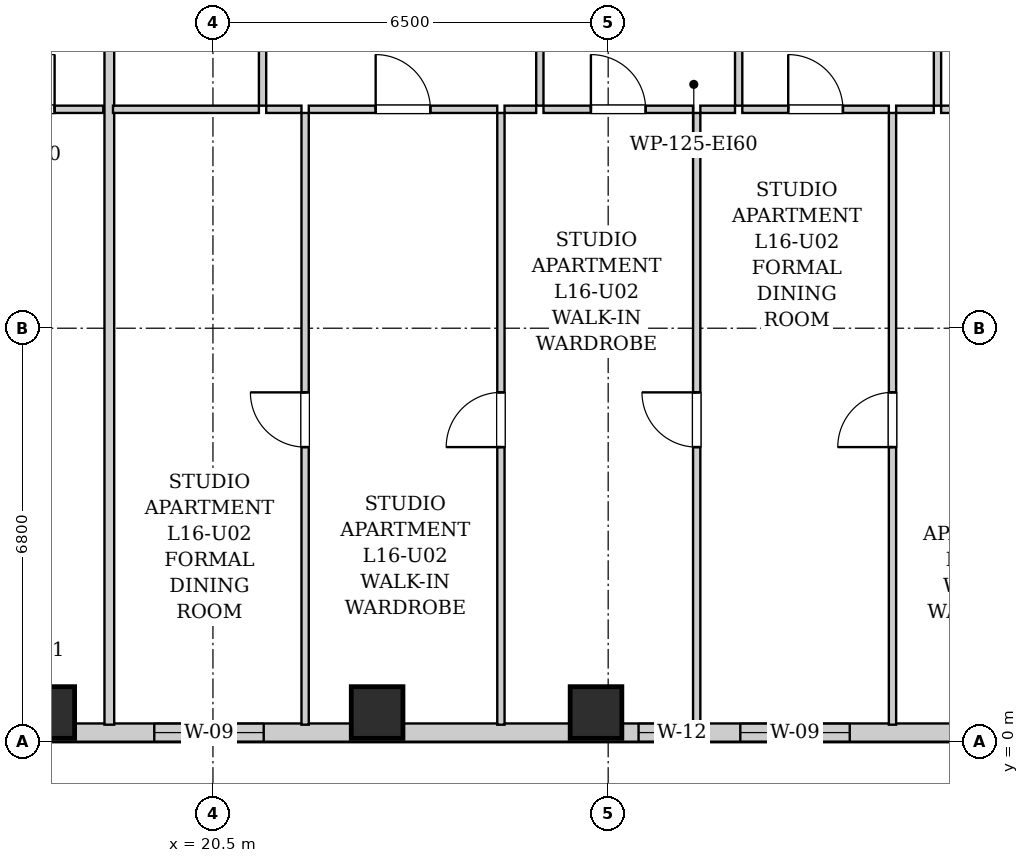
"""IFC4 building model, lengths in metres.
Left out: names, types, materials, properties, quantities, classifications, styles, units other than length and angle.
Written with IfcOpenShell. Run it as: python <this file> out.ifc"""

import sys

from ifc_helpers import new_model, si_unit, direction, frame, frame_2d, origin, origin_2d, place, context, subcontext, project, spatial, rectangle, extrude, element, fill, save


model = new_model("IFC4")
c1 = context("Model", 3, precision=1e-05, world=origin(), true_north=direction((0.0, 1.0)))
c2 = subcontext(c1, "Body", "Model", "MODEL_VIEW")
j1 = project(units=[si_unit("LENGTHUNIT", "METRE"), si_unit("PLANEANGLEUNIT", "RADIAN")], contexts=[c1])
p1 = place(None, origin())
s1 = spatial("IfcSite", under=j1, at=p1, CompositionType="ELEMENT")
p2 = place(p1, origin())
s2 = spatial("IfcBuilding", under=s1, at=p2, CompositionType="ELEMENT")
p3 = place(p2, frame((0.0, 0.0, 61.0)))
s3 = spatial("IfcBuildingStorey", under=s2, at=p3, CompositionType="ELEMENT", Elevation=61.0)
for number, where, z_axis, x_axis in (
    (1, (17.8, 0.48, 0.0), (0.0, 0.0, 1.0), (1.0, 0.0, 0.0)),
    (2, (23.2, 0.48, 0.0), (0.0, 0.0, 1.0), (1.0, 0.0, 0.0)),
    (3, (26.8, 0.48, 0.0), (0.0, 0.0, 1.0), (1.0, 0.0, 0.0)),
):
    element("IfcColumn", number, at=place(p3, frame(where, z_axis=z_axis, x_axis=x_axis)), inside=s3, PredefinedType="COLUMN", context=c2, shape_type="SweptSolid", body=[
        extrude(rectangle(XDim=0.85, YDim=0.85, at=origin_2d()), origin(), (0.0, 0.0, 1.0), 3.2),
    ])
p4 = place(p3, frame((44.0, 0.15, 0.0), z_axis=(0.0, 0.0, 1.0), x_axis=(-1.0, 0.0, 0.0)))
e4 = element("IfcWall", 4, at=p4, inside=s3, PredefinedType="SOLIDWALL", context=c2, shape_type="SweptSolid", body=[
    extrude(rectangle(XDim=26.35, YDim=0.3, at=frame_2d((13.175, 0.0))), origin(), (0.0, 0.0, 1.0), 1.975),
])
p5 = place(p4, frame((22.665, 0.0, 0.55)))
e5 = element("IfcOpeningElement", 5, at=p5, cuts=e4, PredefinedType="OPENING", context=c2, shape_type="SweptSolid", body=[
    extrude(rectangle(XDim=1.8, YDim=1.2, at=frame_2d((0.9, 0.6))), frame((0.0, 0.16, 0.0), z_axis=(0.0, -1.0, 0.0), x_axis=(1.0, 0.0, 0.0)), (0.0, 0.0, 1.0), 0.32),
])
p6 = place(p4, frame((15.82, 0.0, 0.55)))
e6 = element("IfcOpeningElement", 6, at=p6, cuts=e4, PredefinedType="OPENING", context=c2, shape_type="SweptSolid", body=[
    extrude(rectangle(XDim=0.68, YDim=1.2, at=frame_2d((0.34, 0.6))), frame((0.0, 0.16, 0.0), z_axis=(0.0, -1.0, 0.0), x_axis=(1.0, 0.0, 0.0)), (0.0, 0.0, 1.0), 0.32),
])
p7 = place(p4, frame((13.027, 0.0, 0.55)))
e7 = element("IfcOpeningElement", 7, at=p7, cuts=e4, PredefinedType="OPENING", context=c2, shape_type="SweptSolid", body=[
    extrude(rectangle(XDim=1.8, YDim=1.2, at=frame_2d((0.9, 0.6))), frame((0.0, 0.16, 0.0), z_axis=(0.0, -1.0, 0.0), x_axis=(1.0, 0.0, 0.0)), (0.0, 0.0, 1.0), 0.32),
])
p8 = place(p4, frame((9.365, 0.0, 0.55)))
e8 = element("IfcOpeningElement", 8, at=p8, cuts=e4, PredefinedType="OPENING", context=c2, shape_type="SweptSolid", body=[
    extrude(rectangle(XDim=0.85, YDim=1.2, at=frame_2d((0.425, 0.6))), frame((0.0, 0.16, 0.0), z_axis=(0.0, -1.0, 0.0), x_axis=(1.0, 0.0, 0.0)), (0.0, 0.0, 1.0), 0.32),
])
p9 = place(p4, frame((6.553, 0.0, 0.55)))
e9 = element("IfcOpeningElement", 9, at=p9, cuts=e4, PredefinedType="OPENING", context=c2, shape_type="SweptSolid", body=[
    extrude(rectangle(XDim=1.8, YDim=1.2, at=frame_2d((0.9, 0.6))), frame((0.0, 0.16, 0.0), z_axis=(0.0, -1.0, 0.0), x_axis=(1.0, 0.0, 0.0)), (0.0, 0.0, 1.0), 0.32),
])
p10 = place(p4, frame((2.262, 0.0, 0.55)))
e10 = element("IfcOpeningElement", 10, at=p10, cuts=e4, PredefinedType="OPENING", context=c2, shape_type="SweptSolid", body=[
    extrude(rectangle(XDim=1.8, YDim=1.2, at=frame_2d((0.9, 0.6))), frame((0.0, 0.16, 0.0), z_axis=(0.0, -1.0, 0.0), x_axis=(1.0, 0.0, 0.0)), (0.0, 0.0, 1.0), 0.32),
])
p11 = place(p3, frame((16.196, 10.4, 0.0), z_axis=(0.0, 0.0, 1.0), x_axis=(1.0, 0.0, 0.0)))
e11 = element("IfcWall", 11, at=p11, inside=s3, PredefinedType="PARTITIONING", context=c2, shape_type="SweptSolid", body=[
    extrude(rectangle(XDim=2.5, YDim=0.12, at=frame_2d((1.25, 0.0))), origin(), (0.0, 0.0, 1.0), 2.94),
])
p12 = place(p11, frame((0.8, 0.0, 0.0)))
e12 = element("IfcOpeningElement", 12, at=p12, cuts=e11, PredefinedType="OPENING", context=c2, shape_type="SweptSolid", body=[
    extrude(rectangle(XDim=0.9, YDim=2.05, at=frame_2d((0.45, 1.025))), frame((0.0, 0.07, 0.0), z_axis=(0.0, -1.0, 0.0), x_axis=(1.0, 0.0, 0.0)), (0.0, 0.0, 1.0), 0.14),
])
p13 = place(p3, frame((18.796, 0.28, 0.0), z_axis=(0.0, 0.0, 1.0), x_axis=(0.0, 1.0, 0.0)))
e13 = element("IfcWall", 13, at=p13, inside=s3, PredefinedType="PARTITIONING", context=c2, shape_type="SweptSolid", body=[
    extrude(rectangle(XDim=13.03, YDim=0.16, at=frame_2d((6.515, 0.0))), origin(), (0.0, 0.0, 1.0), 2.94),
])
p14 = place(p3, frame((21.316, 10.46, 0.0), z_axis=(0.0, 0.0, 1.0), x_axis=(0.0, 1.0, 0.0)))
e14 = element("IfcWall", 14, at=p14, inside=s3, PredefinedType="PARTITIONING", context=c2, shape_type="SweptSolid", body=[
    extrude(rectangle(XDim=2.85, YDim=0.12, at=frame_2d((1.425, 0.0))), origin(), (0.0, 0.0, 1.0), 2.94),
])
p15 = place(p14, frame((0.995, 0.0, 0.0)))
e15 = element("IfcOpeningElement", 15, at=p15, cuts=e14, PredefinedType="OPENING", context=c2, shape_type="SweptSolid", body=[
    extrude(rectangle(XDim=0.86, YDim=2.05, at=frame_2d((0.43, 1.025))), frame((0.0, 0.07, 0.0), z_axis=(0.0, -1.0, 0.0), x_axis=(1.0, 0.0, 0.0)), (0.0, 0.0, 1.0), 0.14),
])
p16 = place(p3, frame((18.856, 10.4, 0.0), z_axis=(0.0, 0.0, 1.0), x_axis=(1.0, 0.0, 0.0)))
e16 = element("IfcWall", 16, at=p16, inside=s3, PredefinedType="PARTITIONING", context=c2, shape_type="SweptSolid", body=[
    extrude(rectangle(XDim=2.4, YDim=0.12, at=frame_2d((1.2, 0.0))), origin(), (0.0, 0.0, 1.0), 2.94),
])
p17 = place(p3, frame((25.876, 10.46, 0.0), z_axis=(0.0, 0.0, 1.0), x_axis=(0.0, 1.0, 0.0)))
e17 = element("IfcWall", 17, at=p17, inside=s3, PredefinedType="PARTITIONING", context=c2, shape_type="SweptSolid", body=[
    extrude(rectangle(XDim=2.85, YDim=0.12, at=frame_2d((1.425, 0.0))), origin(), (0.0, 0.0, 1.0), 2.94),
])
p18 = place(p17, frame((0.975, 0.0, 0.0)))
e18 = element("IfcOpeningElement", 18, at=p18, cuts=e17, PredefinedType="OPENING", context=c2, shape_type="SweptSolid", body=[
    extrude(rectangle(XDim=0.9, YDim=2.05, at=frame_2d((0.45, 1.025))), frame((0.0, 0.07, 0.0), z_axis=(0.0, -1.0, 0.0), x_axis=(1.0, 0.0, 0.0)), (0.0, 0.0, 1.0), 0.14),
])
p19 = place(p3, frame((21.376, 10.4, 0.0), z_axis=(0.0, 0.0, 1.0), x_axis=(1.0, 0.0, 0.0)))
e19 = element("IfcWall", 19, at=p19, inside=s3, PredefinedType="PARTITIONING", context=c2, shape_type="SweptSolid", body=[
    extrude(rectangle(XDim=0.58, YDim=0.12, at=frame_2d((0.29, 0.0))), origin(), (0.0, 0.0, 1.0), 2.94),
])
p20 = place(p3, frame((22.076, 10.4, 0.0), z_axis=(0.0, 0.0, 1.0), x_axis=(1.0, 0.0, 0.0)))
e20 = element("IfcWall", 20, at=p20, inside=s3, PredefinedType="PARTITIONING", context=c2, shape_type="SweptSolid", body=[
    extrude(rectangle(XDim=3.1, YDim=0.12, at=frame_2d((1.55, 0.0))), origin(), (0.0, 0.0, 1.0), 2.94),
])
p21 = place(p20, frame((1.1, 0.0, 0.0)))
e21 = element("IfcOpeningElement", 21, at=p21, cuts=e20, PredefinedType="OPENING", context=c2, shape_type="SweptSolid", body=[
    extrude(rectangle(XDim=0.9, YDim=2.05, at=frame_2d((0.45, 1.025))), frame((0.0, 0.07, 0.0), z_axis=(0.0, -1.0, 0.0), x_axis=(1.0, 0.0, 0.0)), (0.0, 0.0, 1.0), 0.14),
])
p22 = place(p3, frame((25.296, 10.4, 0.0), z_axis=(0.0, 0.0, 1.0), x_axis=(1.0, 0.0, 0.0)))
e22 = element("IfcWall", 22, at=p22, inside=s3, PredefinedType="PARTITIONING", context=c2, shape_type="SweptSolid", body=[
    extrude(rectangle(XDim=0.52, YDim=0.12, at=frame_2d((0.26, 0.0))), origin(), (0.0, 0.0, 1.0), 2.94),
])
p23 = place(p3, frame((29.146, 10.46, 0.0), z_axis=(0.0, 0.0, 1.0), x_axis=(0.0, 1.0, 0.0)))
e23 = element("IfcWall", 23, at=p23, inside=s3, PredefinedType="PARTITIONING", context=c2, shape_type="SweptSolid", body=[
    extrude(rectangle(XDim=2.85, YDim=0.12, at=frame_2d((1.425, 0.0))), origin(), (0.0, 0.0, 1.0), 2.94),
])
p24 = place(p23, frame((0.975, 0.0, 0.0)))
e24 = element("IfcOpeningElement", 24, at=p24, cuts=e23, PredefinedType="OPENING", context=c2, shape_type="SweptSolid", body=[
    extrude(rectangle(XDim=0.9, YDim=2.05, at=frame_2d((0.45, 1.025))), frame((0.0, 0.07, 0.0), z_axis=(0.0, -1.0, 0.0), x_axis=(1.0, 0.0, 0.0)), (0.0, 0.0, 1.0), 0.14),
])
p25 = place(p3, frame((25.936, 10.4, 0.0), z_axis=(0.0, 0.0, 1.0), x_axis=(1.0, 0.0, 0.0)))
e25 = element("IfcWall", 25, at=p25, inside=s3, PredefinedType="PARTITIONING", context=c2, shape_type="SweptSolid", body=[
    extrude(rectangle(XDim=2.46, YDim=0.12, at=frame_2d((1.23, 0.0))), origin(), (0.0, 0.0, 1.0), 2.94),
])
p26 = place(p25, frame((0.78, 0.0, 0.0)))
e26 = element("IfcOpeningElement", 26, at=p26, cuts=e25, PredefinedType="OPENING", context=c2, shape_type="SweptSolid", body=[
    extrude(rectangle(XDim=0.9, YDim=2.05, at=frame_2d((0.45, 1.025))), frame((0.0, 0.07, 0.0), z_axis=(0.0, -1.0, 0.0), x_axis=(1.0, 0.0, 0.0)), (0.0, 0.0, 1.0), 0.14),
])
p27 = place(p3, frame((28.516, 10.4, 0.0), z_axis=(0.0, 0.0, 1.0), x_axis=(1.0, 0.0, 0.0)))
e27 = element("IfcWall", 27, at=p27, inside=s3, PredefinedType="PARTITIONING", context=c2, shape_type="SweptSolid", body=[
    extrude(rectangle(XDim=0.57, YDim=0.12, at=frame_2d((0.285, 0.0))), origin(), (0.0, 0.0, 1.0), 2.94),
])
p28 = place(p3, frame((32.416, 10.46, 0.0), z_axis=(0.0, 0.0, 1.0), x_axis=(0.0, 1.0, 0.0)))
e28 = element("IfcWall", 28, at=p28, inside=s3, PredefinedType="PARTITIONING", context=c2, shape_type="SweptSolid", body=[
    extrude(rectangle(XDim=2.85, YDim=0.12, at=frame_2d((1.425, 0.0))), origin(), (0.0, 0.0, 1.0), 2.94),
])
p29 = place(p28, frame((0.975, 0.0, 0.0)))
e29 = element("IfcOpeningElement", 29, at=p29, cuts=e28, PredefinedType="OPENING", context=c2, shape_type="SweptSolid", body=[
    extrude(rectangle(XDim=0.9, YDim=2.05, at=frame_2d((0.45, 1.025))), frame((0.0, 0.07, 0.0), z_axis=(0.0, -1.0, 0.0), x_axis=(1.0, 0.0, 0.0)), (0.0, 0.0, 1.0), 0.14),
])
p30 = place(p3, frame((29.206, 10.4, 0.0), z_axis=(0.0, 0.0, 1.0), x_axis=(1.0, 0.0, 0.0)))
e30 = element("IfcWall", 30, at=p30, inside=s3, PredefinedType="PARTITIONING", context=c2, shape_type="SweptSolid", body=[
    extrude(rectangle(XDim=2.41, YDim=0.12, at=frame_2d((1.205, 0.0))), origin(), (0.0, 0.0, 1.0), 2.94),
])
p31 = place(p30, frame((0.755, 0.0, 0.0)))
e31 = element("IfcOpeningElement", 31, at=p31, cuts=e30, PredefinedType="OPENING", context=c2, shape_type="SweptSolid", body=[
    extrude(rectangle(XDim=0.9, YDim=2.05, at=frame_2d((0.45, 1.025))), frame((0.0, 0.07, 0.0), z_axis=(0.0, -1.0, 0.0), x_axis=(1.0, 0.0, 0.0)), (0.0, 0.0, 1.0), 0.14),
])
p32 = place(p3, frame((31.736, 10.4, 0.0), z_axis=(0.0, 0.0, 1.0), x_axis=(1.0, 0.0, 0.0)))
e32 = element("IfcWall", 32, at=p32, inside=s3, PredefinedType="PARTITIONING", context=c2, shape_type="SweptSolid", body=[
    extrude(rectangle(XDim=0.62, YDim=0.12, at=frame_2d((0.31, 0.0))), origin(), (0.0, 0.0, 1.0), 2.94),
])
p33 = place(p3, frame((32.476, 10.4, 0.0), z_axis=(0.0, 0.0, 1.0), x_axis=(1.0, 0.0, 0.0)))
e33 = element("IfcWall", 33, at=p33, inside=s3, PredefinedType="PARTITIONING", context=c2, shape_type="SweptSolid", body=[
    extrude(rectangle(XDim=2.36, YDim=0.12, at=frame_2d((1.18, 0.0))), origin(), (0.0, 0.0, 1.0), 2.94),
])
p34 = place(p33, frame((0.73, 0.0, 0.0)))
e34 = element("IfcOpeningElement", 34, at=p34, cuts=e33, PredefinedType="OPENING", context=c2, shape_type="SweptSolid", body=[
    extrude(rectangle(XDim=0.9, YDim=2.05, at=frame_2d((0.45, 1.025))), frame((0.0, 0.07, 0.0), z_axis=(0.0, -1.0, 0.0), x_axis=(1.0, 0.0, 0.0)), (0.0, 0.0, 1.0), 0.14),
])
p35 = place(p3, frame((22.016, 0.28, 0.0), z_axis=(0.0, 0.0, 1.0), x_axis=(0.0, 1.0, 0.0)))
e35 = element("IfcWall", 35, at=p35, inside=s3, PredefinedType="PARTITIONING", context=c2, shape_type="SweptSolid", body=[
    extrude(rectangle(XDim=10.06, YDim=0.12, at=frame_2d((5.03, 0.0))), origin(), (0.0, 0.0, 1.0), 2.94),
])
p36 = place(p35, frame((4.565, 0.0, 0.0)))
e36 = element("IfcOpeningElement", 36, at=p36, cuts=e35, PredefinedType="OPENING", context=c2, shape_type="SweptSolid", body=[
    extrude(rectangle(XDim=0.9, YDim=2.05, at=frame_2d((0.45, 1.025))), frame((0.0, 0.07, 0.0), z_axis=(0.0, -1.0, 0.0), x_axis=(1.0, 0.0, 0.0)), (0.0, 0.0, 1.0), 0.14),
])
p37 = place(p3, frame((25.236, 0.28, 0.0), z_axis=(0.0, 0.0, 1.0), x_axis=(0.0, 1.0, 0.0)))
e37 = element("IfcWall", 37, at=p37, inside=s3, PredefinedType="PARTITIONING", context=c2, shape_type="SweptSolid", body=[
    extrude(rectangle(XDim=10.06, YDim=0.12, at=frame_2d((5.03, 0.0))), origin(), (0.0, 0.0, 1.0), 2.94),
])
p38 = place(p37, frame((4.565, 0.0, 0.0)))
e38 = element("IfcOpeningElement", 38, at=p38, cuts=e37, PredefinedType="OPENING", context=c2, shape_type="SweptSolid", body=[
    extrude(rectangle(XDim=0.9, YDim=2.05, at=frame_2d((0.45, 1.025))), frame((0.0, 0.07, 0.0), z_axis=(0.0, -1.0, 0.0), x_axis=(1.0, 0.0, 0.0)), (0.0, 0.0, 1.0), 0.14),
])
p39 = place(p3, frame((28.456, 0.28, 0.0), z_axis=(0.0, 0.0, 1.0), x_axis=(0.0, 1.0, 0.0)))
e39 = element("IfcWall", 39, at=p39, inside=s3, PredefinedType="PARTITIONING", context=c2, shape_type="SweptSolid", body=[
    extrude(rectangle(XDim=10.06, YDim=0.12, at=frame_2d((5.03, 0.0))), origin(), (0.0, 0.0, 1.0), 2.94),
])
p40 = place(p39, frame((4.565, 0.0, 0.0)))
e40 = element("IfcOpeningElement", 40, at=p40, cuts=e39, PredefinedType="OPENING", context=c2, shape_type="SweptSolid", body=[
    extrude(rectangle(XDim=0.9, YDim=2.05, at=frame_2d((0.45, 1.025))), frame((0.0, 0.07, 0.0), z_axis=(0.0, -1.0, 0.0), x_axis=(1.0, 0.0, 0.0)), (0.0, 0.0, 1.0), 0.14),
])
p41 = place(p3, frame((31.676, 0.28, 0.0), z_axis=(0.0, 0.0, 1.0), x_axis=(0.0, 1.0, 0.0)))
e41 = element("IfcWall", 41, at=p41, inside=s3, PredefinedType="PARTITIONING", context=c2, shape_type="SweptSolid", body=[
    extrude(rectangle(XDim=10.06, YDim=0.12, at=frame_2d((5.03, 0.0))), origin(), (0.0, 0.0, 1.0), 2.94),
])
p42 = place(p41, frame((4.565, 0.0, 0.0)))
e42 = element("IfcOpeningElement", 42, at=p42, cuts=e41, PredefinedType="OPENING", context=c2, shape_type="SweptSolid", body=[
    extrude(rectangle(XDim=0.9, YDim=2.05, at=frame_2d((0.45, 1.025))), frame((0.0, 0.07, 0.0), z_axis=(0.0, -1.0, 0.0), x_axis=(1.0, 0.0, 0.0)), (0.0, 0.0, 1.0), 0.14),
])
p43 = place(p12, origin())
e43 = element("IfcDoor", 43, at=p43, inside=s3, OperationType="SINGLE_SWING_RIGHT", PredefinedType="DOOR", context=c2, shape_type="SweptSolid", body=[
    extrude(rectangle(XDim=0.9, YDim=2.05, at=frame_2d((0.45, 1.025))), frame((0.0, 0.025, 0.0), z_axis=(0.0, -1.0, 0.0), x_axis=(1.0, 0.0, 0.0)), (0.0, 0.0, 1.0), 0.05),
])
fill(e12, e43)
p44 = place(p21, origin())
e44 = element("IfcDoor", 44, at=p44, inside=s3, OperationType="SINGLE_SWING_LEFT", PredefinedType="DOOR", context=c2, shape_type="SweptSolid", body=[
    extrude(rectangle(XDim=0.9, YDim=2.05, at=frame_2d((0.45, 1.025))), frame((0.0, 0.025, 0.0), z_axis=(0.0, -1.0, 0.0), x_axis=(1.0, 0.0, 0.0)), (0.0, 0.0, 1.0), 0.05),
])
fill(e21, e44)
p45 = place(p26, origin())
e45 = element("IfcDoor", 45, at=p45, inside=s3, OperationType="SINGLE_SWING_LEFT", PredefinedType="DOOR", context=c2, shape_type="SweptSolid", body=[
    extrude(rectangle(XDim=0.9, YDim=2.05, at=frame_2d((0.45, 1.025))), frame((0.0, 0.025, 0.0), z_axis=(0.0, -1.0, 0.0), x_axis=(1.0, 0.0, 0.0)), (0.0, 0.0, 1.0), 0.05),
])
fill(e26, e45)
p46 = place(p31, origin())
e46 = element("IfcDoor", 46, at=p46, inside=s3, OperationType="SINGLE_SWING_LEFT", PredefinedType="DOOR", context=c2, shape_type="SweptSolid", body=[
    extrude(rectangle(XDim=0.9, YDim=2.05, at=frame_2d((0.45, 1.025))), frame((0.0, 0.025, 0.0), z_axis=(0.0, -1.0, 0.0), x_axis=(1.0, 0.0, 0.0)), (0.0, 0.0, 1.0), 0.05),
])
fill(e31, e46)
p47 = place(p36, origin())
e47 = element("IfcDoor", 47, at=p47, inside=s3, OperationType="SINGLE_SWING_RIGHT", PredefinedType="DOOR", context=c2, shape_type="SweptSolid", body=[
    extrude(rectangle(XDim=0.9, YDim=2.05, at=frame_2d((0.45, 1.025))), frame((0.0, 0.025, 0.0), z_axis=(0.0, -1.0, 0.0), x_axis=(1.0, 0.0, 0.0)), (0.0, 0.0, 1.0), 0.05),
])
fill(e36, e47)
p48 = place(p38, origin())
e48 = element("IfcDoor", 48, at=p48, inside=s3, OperationType="SINGLE_SWING_LEFT", PredefinedType="DOOR", context=c2, shape_type="SweptSolid", body=[
    extrude(rectangle(XDim=0.9, YDim=2.05, at=frame_2d((0.45, 1.025))), frame((0.0, 0.025, 0.0), z_axis=(0.0, -1.0, 0.0), x_axis=(1.0, 0.0, 0.0)), (0.0, 0.0, 1.0), 0.05),
])
fill(e38, e48)
p49 = place(p40, origin())
e49 = element("IfcDoor", 49, at=p49, inside=s3, OperationType="SINGLE_SWING_RIGHT", PredefinedType="DOOR", context=c2, shape_type="SweptSolid", body=[
    extrude(rectangle(XDim=0.9, YDim=2.05, at=frame_2d((0.45, 1.025))), frame((0.0, 0.025, 0.0), z_axis=(0.0, -1.0, 0.0), x_axis=(1.0, 0.0, 0.0)), (0.0, 0.0, 1.0), 0.05),
])
fill(e40, e49)
p50 = place(p42, origin())
e50 = element("IfcDoor", 50, at=p50, inside=s3, OperationType="SINGLE_SWING_LEFT", PredefinedType="DOOR", context=c2, shape_type="SweptSolid", body=[
    extrude(rectangle(XDim=0.9, YDim=2.05, at=frame_2d((0.45, 1.025))), frame((0.0, 0.025, 0.0), z_axis=(0.0, -1.0, 0.0), x_axis=(1.0, 0.0, 0.0)), (0.0, 0.0, 1.0), 0.05),
])
fill(e42, e50)
p51 = place(p5, origin())
e51 = element("IfcWindow", 51, at=p51, inside=s3, PartitioningType="DOUBLE_PANEL_VERTICAL", PredefinedType="WINDOW", context=c2, shape_type="SweptSolid", body=[
    extrude(rectangle(XDim=1.8, YDim=1.2, at=frame_2d((0.9, 0.6))), frame((0.0, 0.03, 0.0), z_axis=(0.0, -1.0, 0.0), x_axis=(1.0, 0.0, 0.0)), (0.0, 0.0, 1.0), 0.06),
])
fill(e5, e51)
p52 = place(p6, origin())
e52 = element("IfcWindow", 52, at=p52, inside=s3, PartitioningType="SINGLE_PANEL", PredefinedType="WINDOW", context=c2, shape_type="SweptSolid", body=[
    extrude(rectangle(XDim=0.68, YDim=1.2, at=frame_2d((0.34, 0.6))), frame((0.0, 0.03, 0.0), z_axis=(0.0, -1.0, 0.0), x_axis=(1.0, 0.0, 0.0)), (0.0, 0.0, 1.0), 0.06),
])
fill(e6, e52)
p53 = place(p7, origin())
e53 = element("IfcWindow", 53, at=p53, inside=s3, PartitioningType="DOUBLE_PANEL_VERTICAL", PredefinedType="WINDOW", context=c2, shape_type="SweptSolid", body=[
    extrude(rectangle(XDim=1.8, YDim=1.2, at=frame_2d((0.9, 0.6))), frame((0.0, 0.03, 0.0), z_axis=(0.0, -1.0, 0.0), x_axis=(1.0, 0.0, 0.0)), (0.0, 0.0, 1.0), 0.06),
])
fill(e7, e53)
save(model, sys.argv[1])
